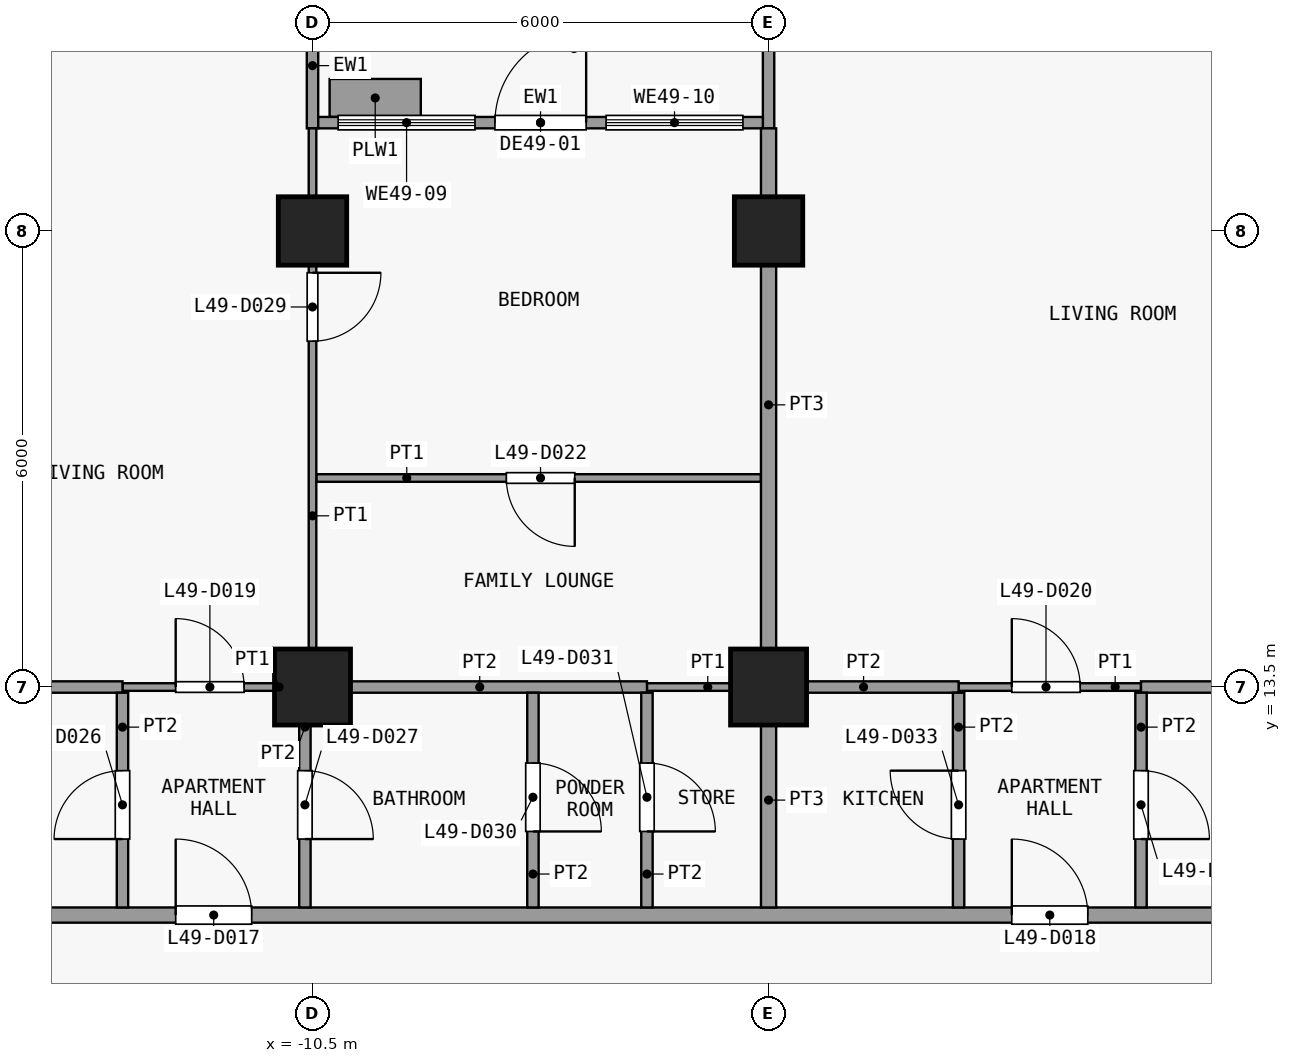
"""IFC4 building model, lengths in metres.
Left out: names, types, materials, properties, quantities, classifications, styles, units other than length and angle.
Written with IfcOpenShell. Run it as: python <this file> out.ifc"""

import sys

from ifc_helpers import new_model, si_unit, direction, frame, frame_2d, origin, origin_2d, place, context, subcontext, project, spatial, rectangle, extrude, element, fill, save


model = new_model("IFC4")
c1 = context("Model", 3, precision=1e-05, world=origin(), true_north=direction((0.0, 1.0)))
c2 = subcontext(c1, "Body", "Model", "MODEL_VIEW")
j1 = project(units=[si_unit("LENGTHUNIT", "METRE"), si_unit("PLANEANGLEUNIT", "RADIAN")], contexts=[c1])
p1 = place(None, origin())
s1 = spatial("IfcSite", under=j1, at=p1, CompositionType="ELEMENT")
p2 = place(p1, origin())
s2 = spatial("IfcBuilding", under=s1, at=p2, CompositionType="ELEMENT")
p3 = place(p2, frame((0.0, 0.0, 196.1)))
s3 = spatial("IfcBuildingStorey", under=s2, at=p3, CompositionType="ELEMENT", Elevation=196.1)
p4 = place(p3, frame((-10.5, 13.5, 0.0), z_axis=(0.0, 0.0, 1.0), x_axis=(1.0, 0.0, 0.0)))
e1 = element("IfcColumn", 1, at=p4, inside=s3, PredefinedType="COLUMN", context=c2, shape_type="SweptSolid", body=[
    extrude(rectangle(XDim=1.0, YDim=1.0, at=origin_2d()), origin(), (0.0, 0.0, 1.0), 3.6),
])
p5 = place(p3, frame((-10.5, 19.5, 0.0), z_axis=(0.0, 0.0, 1.0), x_axis=(1.0, 0.0, 0.0)))
e2 = element("IfcColumn", 2, at=p5, inside=s3, PredefinedType="COLUMN", context=c2, shape_type="SweptSolid", body=[
    extrude(rectangle(XDim=0.9, YDim=0.9, at=origin_2d()), origin(), (0.0, 0.0, 1.0), 3.6),
])
p6 = place(p3, frame((-4.5, 13.5, 0.0), z_axis=(0.0, 0.0, 1.0), x_axis=(1.0, 0.0, 0.0)))
e3 = element("IfcColumn", 3, at=p6, inside=s3, PredefinedType="COLUMN", context=c2, shape_type="SweptSolid", body=[
    extrude(rectangle(XDim=1.0, YDim=1.0, at=origin_2d()), origin(), (0.0, 0.0, 1.0), 3.6),
])
p7 = place(p3, frame((-4.5, 19.5, 0.0), z_axis=(0.0, 0.0, 1.0), x_axis=(1.0, 0.0, 0.0)))
e4 = element("IfcColumn", 4, at=p7, inside=s3, PredefinedType="COLUMN", context=c2, shape_type="SweptSolid", body=[
    extrude(rectangle(XDim=0.9, YDim=0.9, at=origin_2d()), origin(), (0.0, 0.0, 1.0), 3.6),
])
p8 = place(p3, frame((-10.5, 20.85, 0.0), z_axis=(0.0, 0.0, 1.0), x_axis=(0.0, 1.0, 0.0)))
e5 = element("IfcWall", 5, at=p8, inside=s3, PredefinedType="SOLIDWALL", context=c2, shape_type="SweptSolid", body=[
    extrude(rectangle(XDim=1.65, YDim=0.15, at=frame_2d((0.825, 0.0))), origin(), (0.0, 0.0, 1.0), 3.15),
])
p9 = place(p3, frame((-4.5, 20.85, 0.0), z_axis=(0.0, 0.0, 1.0), x_axis=(0.0, 1.0, 0.0)))
e6 = element("IfcWall", 6, at=p9, inside=s3, PredefinedType="SOLIDWALL", context=c2, shape_type="SweptSolid", body=[
    extrude(rectangle(XDim=2.55, YDim=0.15, at=frame_2d((1.275, 0.0))), origin(), (0.0, 0.0, 1.0), 3.15),
])
p10 = place(p3, frame((-10.425, 20.925, 0.0), z_axis=(0.0, 0.0, 1.0), x_axis=(1.0, 0.0, 0.0)))
e7 = element("IfcWall", 7, at=p10, inside=s3, PredefinedType="SOLIDWALL", context=c2, shape_type="SweptSolid", body=[
    extrude(rectangle(XDim=5.85, YDim=0.15, at=frame_2d((2.925, 0.0))), origin(), (0.0, 0.0, 1.0), 3.15),
])
p11 = place(p10, frame((2.325, 0.0, 0.0)))
e8 = element("IfcOpeningElement", 8, at=p11, cuts=e7, PredefinedType="OPENING", context=c2, shape_type="SweptSolid", body=[
    extrude(rectangle(XDim=1.2, YDim=2.4, at=frame_2d((0.6, 1.2))), frame((0.0, 0.085, 0.0), z_axis=(0.0, -1.0, 0.0), x_axis=(1.0, 0.0, 0.0)), (0.0, 0.0, 1.0), 0.17),
])
p12 = place(p10, frame((0.262, 0.0, 0.9)))
e9 = element("IfcOpeningElement", 9, at=p12, cuts=e7, PredefinedType="OPENING", context=c2, shape_type="SweptSolid", body=[
    extrude(rectangle(XDim=1.8, YDim=2.1, at=frame_2d((0.9, 1.05))), frame((0.0, 0.085, 0.0), z_axis=(0.0, -1.0, 0.0), x_axis=(1.0, 0.0, 0.0)), (0.0, 0.0, 1.0), 0.17),
])
p13 = place(p10, frame((3.788, 0.0, 0.9)))
e10 = element("IfcOpeningElement", 10, at=p13, cuts=e7, PredefinedType="OPENING", context=c2, shape_type="SweptSolid", body=[
    extrude(rectangle(XDim=1.8, YDim=2.1, at=frame_2d((0.9, 1.05))), frame((0.0, 0.085, 0.0), z_axis=(0.0, -1.0, 0.0), x_axis=(1.0, 0.0, 0.0)), (0.0, 0.0, 1.0), 0.17),
])
p14 = place(p3, frame((-10.275, 21.25, 0.0), z_axis=(0.0, 0.0, 1.0), x_axis=(1.0, 0.0, 0.0)))
e11 = element("IfcWall", 11, at=p14, inside=s3, PredefinedType="USERDEFINED", context=c2, shape_type="SweptSolid", body=[
    extrude(rectangle(XDim=1.2, YDim=0.5, at=frame_2d((0.6, 0.0))), origin(), (0.0, 0.0, 1.0), 0.9),
])
p15 = place(p3, frame((-17.85, 10.5, 0.0), z_axis=(0.0, 0.0, 1.0), x_axis=(1.0, 0.0, 0.0)))
e12 = element("IfcWall", 12, at=p15, inside=s3, PredefinedType="PARTITIONING", context=c2, shape_type="SweptSolid", body=[
    extrude(rectangle(XDim=35.7, YDim=0.2, at=frame_2d((17.85, 0.0))), origin(), (0.0, 0.0, 1.0), 3.15),
])
p16 = place(p15, frame((5.55, 0.0, 0.0)))
e13 = element("IfcOpeningElement", 13, at=p16, cuts=e12, PredefinedType="OPENING", context=c2, shape_type="SweptSolid", body=[
    extrude(rectangle(XDim=1.0, YDim=2.1, at=frame_2d((0.5, 1.05))), frame((0.0, 0.11, 0.0), z_axis=(0.0, -1.0, 0.0), x_axis=(1.0, 0.0, 0.0)), (0.0, 0.0, 1.0), 0.22),
])
p17 = place(p15, frame((16.55, 0.0, 0.0)))
e14 = element("IfcOpeningElement", 14, at=p17, cuts=e12, PredefinedType="OPENING", context=c2, shape_type="SweptSolid", body=[
    extrude(rectangle(XDim=1.0, YDim=2.1, at=frame_2d((0.5, 1.05))), frame((0.0, 0.11, 0.0), z_axis=(0.0, -1.0, 0.0), x_axis=(1.0, 0.0, 0.0)), (0.0, 0.0, 1.0), 0.22),
])
p18 = place(p3, frame((-13.0, 13.5, 0.0), z_axis=(0.0, 0.0, 1.0), x_axis=(1.0, 0.0, 0.0)))
e15 = element("IfcWall", 15, at=p18, inside=s3, PredefinedType="PARTITIONING", context=c2, shape_type="SweptSolid", body=[
    extrude(rectangle(XDim=2.4, YDim=0.1, at=frame_2d((1.2, 0.0))), origin(), (0.0, 0.0, 1.0), 3.15),
])
p19 = place(p18, frame((0.7, 0.0, 0.0)))
e16 = element("IfcOpeningElement", 16, at=p19, cuts=e15, PredefinedType="OPENING", context=c2, shape_type="SweptSolid", body=[
    extrude(rectangle(XDim=0.9, YDim=2.1, at=frame_2d((0.45, 1.05))), frame((0.0, 0.06, 0.0), z_axis=(0.0, -1.0, 0.0), x_axis=(1.0, 0.0, 0.0)), (0.0, 0.0, 1.0), 0.12),
])
p20 = place(p3, frame((-6.1, 13.5, 0.0), z_axis=(0.0, 0.0, 1.0), x_axis=(1.0, 0.0, 0.0)))
e17 = element("IfcWall", 17, at=p20, inside=s3, PredefinedType="PARTITIONING", context=c2, shape_type="SweptSolid", body=[
    extrude(rectangle(XDim=1.6, YDim=0.1, at=frame_2d((0.8, 0.0))), origin(), (0.0, 0.0, 1.0), 3.15),
])
p21 = place(p3, frame((-2.0, 13.5, 0.0), z_axis=(0.0, 0.0, 1.0), x_axis=(1.0, 0.0, 0.0)))
e18 = element("IfcWall", 18, at=p21, inside=s3, PredefinedType="PARTITIONING", context=c2, shape_type="SweptSolid", body=[
    extrude(rectangle(XDim=2.4, YDim=0.1, at=frame_2d((1.2, 0.0))), origin(), (0.0, 0.0, 1.0), 3.15),
])
p22 = place(p21, frame((0.7, 0.0, 0.0)))
e19 = element("IfcOpeningElement", 19, at=p22, cuts=e18, PredefinedType="OPENING", context=c2, shape_type="SweptSolid", body=[
    extrude(rectangle(XDim=0.9, YDim=2.1, at=frame_2d((0.45, 1.05))), frame((0.0, 0.06, 0.0), z_axis=(0.0, -1.0, 0.0), x_axis=(1.0, 0.0, 0.0)), (0.0, 0.0, 1.0), 0.12),
])
p23 = place(p3, frame((-17.85, 13.5, 0.0), z_axis=(0.0, 0.0, 1.0), x_axis=(1.0, 0.0, 0.0)))
e20 = element("IfcWall", 20, at=p23, inside=s3, PredefinedType="PARTITIONING", context=c2, shape_type="SweptSolid", body=[
    extrude(rectangle(XDim=4.85, YDim=0.15, at=frame_2d((2.425, 0.0))), origin(), (0.0, 0.0, 1.0), 3.15),
])
p24 = place(p3, frame((-10.5, 13.5, 0.0), z_axis=(0.0, 0.0, 1.0), x_axis=(1.0, 0.0, 0.0)))
e21 = element("IfcWall", 21, at=p24, inside=s3, PredefinedType="PARTITIONING", context=c2, shape_type="SweptSolid", body=[
    extrude(rectangle(XDim=4.4, YDim=0.15, at=frame_2d((2.2, 0.0))), origin(), (0.0, 0.0, 1.0), 3.15),
])
p25 = place(p3, frame((-4.5, 13.5, 0.0), z_axis=(0.0, 0.0, 1.0), x_axis=(1.0, 0.0, 0.0)))
e22 = element("IfcWall", 22, at=p25, inside=s3, PredefinedType="PARTITIONING", context=c2, shape_type="SweptSolid", body=[
    extrude(rectangle(XDim=2.5, YDim=0.15, at=frame_2d((1.25, 0.0))), origin(), (0.0, 0.0, 1.0), 3.15),
])
p26 = place(p3, frame((0.4, 13.5, 0.0), z_axis=(0.0, 0.0, 1.0), x_axis=(1.0, 0.0, 0.0)))
e23 = element("IfcWall", 23, at=p26, inside=s3, PredefinedType="PARTITIONING", context=c2, shape_type="SweptSolid", body=[
    extrude(rectangle(XDim=10.667, YDim=0.15, at=frame_2d((5.333, 0.0))), origin(), (0.0, 0.0, 1.0), 3.15),
])
p27 = place(p3, frame((-10.45, 16.25, 0.0), z_axis=(0.0, 0.0, 1.0), x_axis=(1.0, 0.0, 0.0)))
e24 = element("IfcWall", 24, at=p27, inside=s3, PredefinedType="PARTITIONING", context=c2, shape_type="SweptSolid", body=[
    extrude(rectangle(XDim=5.85, YDim=0.1, at=frame_2d((2.925, 0.0))), origin(), (0.0, 0.0, 1.0), 3.15),
])
p28 = place(p27, frame((2.5, 0.0, 0.0)))
e25 = element("IfcOpeningElement", 25, at=p28, cuts=e24, PredefinedType="OPENING", context=c2, shape_type="SweptSolid", body=[
    extrude(rectangle(XDim=0.9, YDim=2.1, at=frame_2d((0.45, 1.05))), frame((0.0, 0.06, 0.0), z_axis=(0.0, -1.0, 0.0), x_axis=(1.0, 0.0, 0.0)), (0.0, 0.0, 1.0), 0.12),
])
p29 = place(p3, frame((-13.0, 10.6, 0.0), z_axis=(0.0, 0.0, 1.0), x_axis=(0.0, 1.0, 0.0)))
e26 = element("IfcWall", 26, at=p29, inside=s3, PredefinedType="PARTITIONING", context=c2, shape_type="SweptSolid", body=[
    extrude(rectangle(XDim=2.825, YDim=0.15, at=frame_2d((1.413, 0.0))), origin(), (0.0, 0.0, 1.0), 3.15),
])
p30 = place(p29, frame((0.9, 0.0, 0.0)))
e27 = element("IfcOpeningElement", 27, at=p30, cuts=e26, PredefinedType="OPENING", context=c2, shape_type="SweptSolid", body=[
    extrude(rectangle(XDim=0.9, YDim=2.1, at=frame_2d((0.45, 1.05))), frame((0.0, 0.085, 0.0), z_axis=(0.0, -1.0, 0.0), x_axis=(1.0, 0.0, 0.0)), (0.0, 0.0, 1.0), 0.17),
])
p31 = place(p3, frame((-10.6, 10.6, 0.0), z_axis=(0.0, 0.0, 1.0), x_axis=(0.0, 1.0, 0.0)))
e28 = element("IfcWall", 28, at=p31, inside=s3, PredefinedType="PARTITIONING", context=c2, shape_type="SweptSolid", body=[
    extrude(rectangle(XDim=2.825, YDim=0.15, at=frame_2d((1.413, 0.0))), origin(), (0.0, 0.0, 1.0), 3.15),
])
p32 = place(p31, frame((0.9, 0.0, 0.0)))
e29 = element("IfcOpeningElement", 29, at=p32, cuts=e28, PredefinedType="OPENING", context=c2, shape_type="SweptSolid", body=[
    extrude(rectangle(XDim=0.9, YDim=2.1, at=frame_2d((0.45, 1.05))), frame((0.0, 0.085, 0.0), z_axis=(0.0, -1.0, 0.0), x_axis=(1.0, 0.0, 0.0)), (0.0, 0.0, 1.0), 0.17),
])
p33 = place(p3, frame((-10.5, 13.575, 0.0), z_axis=(0.0, 0.0, 1.0), x_axis=(0.0, 1.0, 0.0)))
e30 = element("IfcWall", 30, at=p33, inside=s3, PredefinedType="PARTITIONING", context=c2, shape_type="SweptSolid", body=[
    extrude(rectangle(XDim=7.275, YDim=0.1, at=frame_2d((3.638, 0.0))), origin(), (0.0, 0.0, 1.0), 3.15),
])
p34 = place(p33, frame((4.475, 0.0, 0.0)))
e31 = element("IfcOpeningElement", 31, at=p34, cuts=e30, PredefinedType="OPENING", context=c2, shape_type="SweptSolid", body=[
    extrude(rectangle(XDim=0.9, YDim=2.1, at=frame_2d((0.45, 1.05))), frame((0.0, 0.06, 0.0), z_axis=(0.0, -1.0, 0.0), x_axis=(1.0, 0.0, 0.0)), (0.0, 0.0, 1.0), 0.12),
])
p35 = place(p3, frame((-7.6, 10.6, 0.0), z_axis=(0.0, 0.0, 1.0), x_axis=(0.0, 1.0, 0.0)))
e32 = element("IfcWall", 32, at=p35, inside=s3, PredefinedType="PARTITIONING", context=c2, shape_type="SweptSolid", body=[
    extrude(rectangle(XDim=2.825, YDim=0.15, at=frame_2d((1.413, 0.0))), origin(), (0.0, 0.0, 1.0), 3.15),
])
p36 = place(p35, frame((1.0, 0.0, 0.0)))
e33 = element("IfcOpeningElement", 33, at=p36, cuts=e32, PredefinedType="OPENING", context=c2, shape_type="SweptSolid", body=[
    extrude(rectangle(XDim=0.9, YDim=2.1, at=frame_2d((0.45, 1.05))), frame((0.0, 0.085, 0.0), z_axis=(0.0, -1.0, 0.0), x_axis=(1.0, 0.0, 0.0)), (0.0, 0.0, 1.0), 0.17),
])
p37 = place(p3, frame((-6.1, 10.6, 0.0), z_axis=(0.0, 0.0, 1.0), x_axis=(0.0, 1.0, 0.0)))
e34 = element("IfcWall", 34, at=p37, inside=s3, PredefinedType="PARTITIONING", context=c2, shape_type="SweptSolid", body=[
    extrude(rectangle(XDim=2.825, YDim=0.15, at=frame_2d((1.413, 0.0))), origin(), (0.0, 0.0, 1.0), 3.15),
])
p38 = place(p37, frame((1.0, 0.0, 0.0)))
e35 = element("IfcOpeningElement", 35, at=p38, cuts=e34, PredefinedType="OPENING", context=c2, shape_type="SweptSolid", body=[
    extrude(rectangle(XDim=0.9, YDim=2.1, at=frame_2d((0.45, 1.05))), frame((0.0, 0.085, 0.0), z_axis=(0.0, -1.0, 0.0), x_axis=(1.0, 0.0, 0.0)), (0.0, 0.0, 1.0), 0.17),
])
p39 = place(p3, frame((-4.5, 10.6, 0.0), z_axis=(0.0, 0.0, 1.0), x_axis=(0.0, 1.0, 0.0)))
e36 = element("IfcWall", 36, at=p39, inside=s3, PredefinedType="PARTITIONING", context=c2, shape_type="SweptSolid", body=[
    extrude(rectangle(XDim=2.825, YDim=0.2, at=frame_2d((1.413, 0.0))), origin(), (0.0, 0.0, 1.0), 3.15),
])
p40 = place(p3, frame((-4.5, 13.575, 0.0), z_axis=(0.0, 0.0, 1.0), x_axis=(0.0, 1.0, 0.0)))
e37 = element("IfcWall", 37, at=p40, inside=s3, PredefinedType="PARTITIONING", context=c2, shape_type="SweptSolid", body=[
    extrude(rectangle(XDim=7.275, YDim=0.2, at=frame_2d((3.638, 0.0))), origin(), (0.0, 0.0, 1.0), 3.15),
])
p41 = place(p3, frame((-2.0, 10.6, 0.0), z_axis=(0.0, 0.0, 1.0), x_axis=(0.0, 1.0, 0.0)))
e38 = element("IfcWall", 38, at=p41, inside=s3, PredefinedType="PARTITIONING", context=c2, shape_type="SweptSolid", body=[
    extrude(rectangle(XDim=2.825, YDim=0.15, at=frame_2d((1.413, 0.0))), origin(), (0.0, 0.0, 1.0), 3.15),
])
p42 = place(p41, frame((0.9, 0.0, 0.0)))
e39 = element("IfcOpeningElement", 39, at=p42, cuts=e38, PredefinedType="OPENING", context=c2, shape_type="SweptSolid", body=[
    extrude(rectangle(XDim=0.9, YDim=2.1, at=frame_2d((0.45, 1.05))), frame((0.0, 0.085, 0.0), z_axis=(0.0, -1.0, 0.0), x_axis=(1.0, 0.0, 0.0)), (0.0, 0.0, 1.0), 0.17),
])
p43 = place(p3, frame((0.4, 10.6, 0.0), z_axis=(0.0, 0.0, 1.0), x_axis=(0.0, 1.0, 0.0)))
e40 = element("IfcWall", 40, at=p43, inside=s3, PredefinedType="PARTITIONING", context=c2, shape_type="SweptSolid", body=[
    extrude(rectangle(XDim=2.825, YDim=0.15, at=frame_2d((1.413, 0.0))), origin(), (0.0, 0.0, 1.0), 3.15),
])
p44 = place(p43, frame((0.9, 0.0, 0.0)))
e41 = element("IfcOpeningElement", 41, at=p44, cuts=e40, PredefinedType="OPENING", context=c2, shape_type="SweptSolid", body=[
    extrude(rectangle(XDim=0.9, YDim=2.1, at=frame_2d((0.45, 1.05))), frame((0.0, 0.085, 0.0), z_axis=(0.0, -1.0, 0.0), x_axis=(1.0, 0.0, 0.0)), (0.0, 0.0, 1.0), 0.17),
])
p45 = place(p11, origin())
e42 = element("IfcDoor", 42, at=p45, inside=s3, OperationType="SINGLE_SWING_RIGHT", PredefinedType="DOOR", context=c2, shape_type="SweptSolid", body=[
    extrude(rectangle(XDim=1.2, YDim=2.4, at=frame_2d((0.6, 1.2))), frame((0.0, 0.025, 0.0), z_axis=(0.0, -1.0, 0.0), x_axis=(1.0, 0.0, 0.0)), (0.0, 0.0, 1.0), 0.05),
])
fill(e8, e42)
p46 = place(p12, origin())
e43 = element("IfcWindow", 43, at=p46, inside=s3, PartitioningType="SINGLE_PANEL", PredefinedType="WINDOW", context=c2, shape_type="SweptSolid", body=[
    extrude(rectangle(XDim=1.8, YDim=2.1, at=frame_2d((0.9, 1.05))), frame((0.0, 0.03, 0.0), z_axis=(0.0, -1.0, 0.0), x_axis=(1.0, 0.0, 0.0)), (0.0, 0.0, 1.0), 0.06),
])
fill(e9, e43)
p47 = place(p13, origin())
e44 = element("IfcWindow", 44, at=p47, inside=s3, PartitioningType="SINGLE_PANEL", PredefinedType="WINDOW", context=c2, shape_type="SweptSolid", body=[
    extrude(rectangle(XDim=1.8, YDim=2.1, at=frame_2d((0.9, 1.05))), frame((0.0, 0.03, 0.0), z_axis=(0.0, -1.0, 0.0), x_axis=(1.0, 0.0, 0.0)), (0.0, 0.0, 1.0), 0.06),
])
fill(e10, e44)
p48 = place(p16, origin())
e45 = element("IfcDoor", 45, at=p48, inside=s3, OperationType="SINGLE_SWING_RIGHT", PredefinedType="DOOR", context=c2, shape_type="SweptSolid", body=[
    extrude(rectangle(XDim=1.0, YDim=2.1, at=frame_2d((0.5, 1.05))), frame((0.0, 0.025, 0.0), z_axis=(0.0, -1.0, 0.0), x_axis=(1.0, 0.0, 0.0)), (0.0, 0.0, 1.0), 0.05),
])
fill(e13, e45)
p49 = place(p17, origin())
e46 = element("IfcDoor", 46, at=p49, inside=s3, OperationType="SINGLE_SWING_RIGHT", PredefinedType="DOOR", context=c2, shape_type="SweptSolid", body=[
    extrude(rectangle(XDim=1.0, YDim=2.1, at=frame_2d((0.5, 1.05))), frame((0.0, 0.025, 0.0), z_axis=(0.0, -1.0, 0.0), x_axis=(1.0, 0.0, 0.0)), (0.0, 0.0, 1.0), 0.05),
])
fill(e14, e46)
p50 = place(p19, origin())
e47 = element("IfcDoor", 47, at=p50, inside=s3, OperationType="SINGLE_SWING_RIGHT", PredefinedType="DOOR", context=c2, shape_type="SweptSolid", body=[
    extrude(rectangle(XDim=0.9, YDim=2.1, at=frame_2d((0.45, 1.05))), frame((0.0, 0.025, 0.0), z_axis=(0.0, -1.0, 0.0), x_axis=(1.0, 0.0, 0.0)), (0.0, 0.0, 1.0), 0.05),
])
fill(e16, e47)
p51 = place(p22, origin())
e48 = element("IfcDoor", 48, at=p51, inside=s3, OperationType="SINGLE_SWING_RIGHT", PredefinedType="DOOR", context=c2, shape_type="SweptSolid", body=[
    extrude(rectangle(XDim=0.9, YDim=2.1, at=frame_2d((0.45, 1.05))), frame((0.0, 0.025, 0.0), z_axis=(0.0, -1.0, 0.0), x_axis=(1.0, 0.0, 0.0)), (0.0, 0.0, 1.0), 0.05),
])
fill(e19, e48)
p52 = place(p28, origin())
e49 = element("IfcDoor", 49, at=p52, inside=s3, OperationType="SINGLE_SWING_RIGHT", PredefinedType="DOOR", context=c2, shape_type="SweptSolid", body=[
    extrude(rectangle(XDim=0.9, YDim=2.1, at=frame_2d((0.45, 1.05))), frame((0.0, 0.025, 0.0), z_axis=(0.0, -1.0, 0.0), x_axis=(1.0, 0.0, 0.0)), (0.0, 0.0, 1.0), 0.05),
])
fill(e25, e49)
p53 = place(p30, origin())
e50 = element("IfcDoor", 50, at=p53, inside=s3, OperationType="SINGLE_SWING_RIGHT", PredefinedType="DOOR", context=c2, shape_type="SweptSolid", body=[
    extrude(rectangle(XDim=0.9, YDim=2.1, at=frame_2d((0.45, 1.05))), frame((0.0, 0.025, 0.0), z_axis=(0.0, -1.0, 0.0), x_axis=(1.0, 0.0, 0.0)), (0.0, 0.0, 1.0), 0.05),
])
fill(e27, e50)
p54 = place(p32, origin())
e51 = element("IfcDoor", 51, at=p54, inside=s3, OperationType="SINGLE_SWING_LEFT", PredefinedType="DOOR", context=c2, shape_type="SweptSolid", body=[
    extrude(rectangle(XDim=0.9, YDim=2.1, at=frame_2d((0.45, 1.05))), frame((0.0, 0.025, 0.0), z_axis=(0.0, -1.0, 0.0), x_axis=(1.0, 0.0, 0.0)), (0.0, 0.0, 1.0), 0.05),
])
fill(e29, e51)
p55 = place(p34, origin())
e52 = element("IfcDoor", 52, at=p55, inside=s3, OperationType="SINGLE_SWING_RIGHT", PredefinedType="DOOR", context=c2, shape_type="SweptSolid", body=[
    extrude(rectangle(XDim=0.9, YDim=2.1, at=frame_2d((0.45, 1.05))), frame((0.0, 0.025, 0.0), z_axis=(0.0, -1.0, 0.0), x_axis=(1.0, 0.0, 0.0)), (0.0, 0.0, 1.0), 0.05),
])
fill(e31, e52)
p56 = place(p36, origin())
e53 = element("IfcDoor", 53, at=p56, inside=s3, OperationType="SINGLE_SWING_LEFT", PredefinedType="DOOR", context=c2, shape_type="SweptSolid", body=[
    extrude(rectangle(XDim=0.9, YDim=2.1, at=frame_2d((0.45, 1.05))), frame((0.0, 0.025, 0.0), z_axis=(0.0, -1.0, 0.0), x_axis=(1.0, 0.0, 0.0)), (0.0, 0.0, 1.0), 0.05),
])
fill(e33, e53)
p57 = place(p38, origin())
e54 = element("IfcDoor", 54, at=p57, inside=s3, OperationType="SINGLE_SWING_LEFT", PredefinedType="DOOR", context=c2, shape_type="SweptSolid", body=[
    extrude(rectangle(XDim=0.9, YDim=2.1, at=frame_2d((0.45, 1.05))), frame((0.0, 0.025, 0.0), z_axis=(0.0, -1.0, 0.0), x_axis=(1.0, 0.0, 0.0)), (0.0, 0.0, 1.0), 0.05),
])
fill(e35, e54)
p58 = place(p42, origin())
e55 = element("IfcDoor", 55, at=p58, inside=s3, OperationType="SINGLE_SWING_LEFT", PredefinedType="DOOR", context=c2, shape_type="SweptSolid", body=[
    extrude(rectangle(XDim=0.9, YDim=2.1, at=frame_2d((0.45, 1.05))), frame((0.0, 0.025, 0.0), z_axis=(0.0, -1.0, 0.0), x_axis=(1.0, 0.0, 0.0)), (0.0, 0.0, 1.0), 0.05),
])
fill(e39, e55)
p59 = place(p44, origin())
e56 = element("IfcDoor", 56, at=p59, inside=s3, OperationType="SINGLE_SWING_LEFT", PredefinedType="DOOR", context=c2, shape_type="SweptSolid", body=[
    extrude(rectangle(XDim=0.9, YDim=2.1, at=frame_2d((0.45, 1.05))), frame((0.0, 0.025, 0.0), z_axis=(0.0, -1.0, 0.0), x_axis=(1.0, 0.0, 0.0)), (0.0, 0.0, 1.0), 0.05),
])
fill(e41, e56)
save(model, sys.argv[1])
